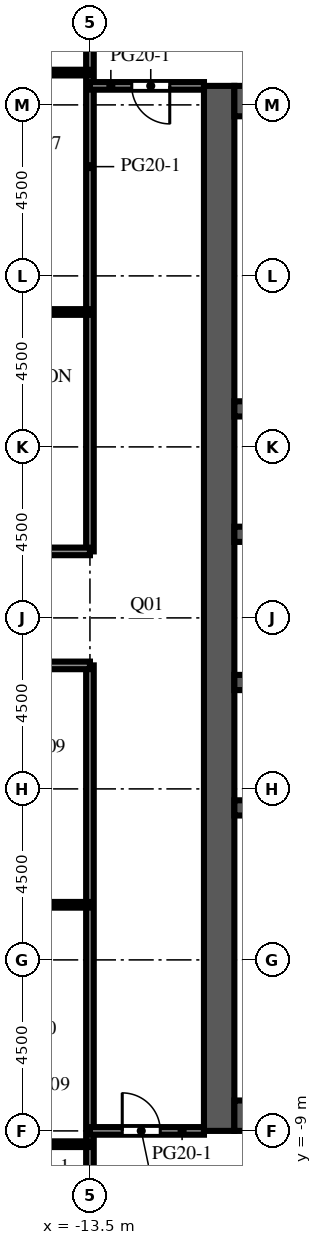
"""IFC4 building model, lengths in metres.
Left out: names, types, materials, properties, quantities, classifications, styles, units other than length and angle.
Written with IfcOpenShell. Run it as: python <this file> out.ifc"""

import sys

from ifc_helpers import new_model, si_unit, direction, frame, frame_2d, origin, place, context, subcontext, project, spatial, rectangle, extrude, element, fill, save


model = new_model("IFC4")
c1 = context("Model", 3, precision=1e-05, world=origin(), true_north=direction((0.0, 1.0)))
c2 = subcontext(c1, "Body", "Model", "MODEL_VIEW")
j1 = project(units=[si_unit("LENGTHUNIT", "METRE"), si_unit("PLANEANGLEUNIT", "RADIAN")], contexts=[c1])
p1 = place(None, origin())
s1 = spatial("IfcSite", under=j1, at=p1, CompositionType="ELEMENT")
p2 = place(p1, origin())
s2 = spatial("IfcBuilding", under=s1, at=p2, CompositionType="ELEMENT")
p3 = place(p2, frame((0.0, 0.0, 203.8)))
s3 = spatial("IfcBuildingStorey", under=s2, at=p3, CompositionType="ELEMENT", Elevation=203.8)
p4 = place(p3, frame((-10.1, -9.0, 0.0), z_axis=(0.0, 0.0, 1.0), x_axis=(0.0, 1.0, 0.0)))
e1 = element("IfcWall", 1, at=p4, inside=s3, PredefinedType="SHEAR", context=c2, shape_type="SweptSolid", body=[
    extrude(rectangle(XDim=27.5, YDim=0.8, at=frame_2d((13.75, 0.0))), origin(), (0.0, 0.0, 1.0), 4.1),
])
p5 = place(p4, frame((12.55, 0.0, 0.0)))
e2 = element("IfcOpeningElement", 2, at=p5, cuts=e1, PredefinedType="OPENING", context=c2, shape_type="SweptSolid", body=[
    extrude(rectangle(XDim=2.4, YDim=2.4, at=frame_2d((1.2, 1.2))), frame((0.0, 0.41, 0.0), z_axis=(0.0, -1.0, 0.0), x_axis=(1.0, 0.0, 0.0)), (0.0, 0.0, 1.0), 0.82),
])
p6 = place(p4, frame((6.825, 0.0, 0.0)))
e3 = element("IfcOpeningElement", 3, at=p6, cuts=e1, PredefinedType="OPENING", context=c2, shape_type="SweptSolid", body=[
    extrude(rectangle(XDim=1.2, YDim=2.1, at=frame_2d((0.6, 1.05))), frame((0.0, 0.41, 0.0), z_axis=(0.0, -1.0, 0.0), x_axis=(1.0, 0.0, 0.0)), (0.0, 0.0, 1.0), 0.82),
])
p7 = place(p4, frame((19.475, 0.0, 0.0)))
e4 = element("IfcOpeningElement", 4, at=p7, cuts=e1, PredefinedType="OPENING", context=c2, shape_type="SweptSolid", body=[
    extrude(rectangle(XDim=1.2, YDim=2.1, at=frame_2d((0.6, 1.05))), frame((0.0, 0.41, 0.0), z_axis=(0.0, -1.0, 0.0), x_axis=(1.0, 0.0, 0.0)), (0.0, 0.0, 1.0), 0.82),
])
for number, where, z_axis, x_axis in (
    (5, (-9.7, -8.6, 0.0), (0.0, 0.0, 1.0), (1.0, 0.0, 0.0)),
    (6, (-9.7, 18.1, 0.0), (0.0, 0.0, 1.0), (1.0, 0.0, 0.0)),
):
    element("IfcWall", number, at=place(p3, frame(where, z_axis=z_axis, x_axis=x_axis)), inside=s3, PredefinedType="SHEAR", context=c2, shape_type="SweptSolid", body=[
        extrude(rectangle(XDim=10.4, YDim=0.8, at=frame_2d((5.2, 0.0))), origin(), (0.0, 0.0, 1.0), 4.1),
    ])
p8 = place(p3, frame((-9.7, -0.5, 0.0), z_axis=(0.0, 0.0, 1.0), x_axis=(1.0, 0.0, 0.0)))
e7 = element("IfcWall", 7, at=p8, inside=s3, PredefinedType="SHEAR", context=c2, shape_type="SweptSolid", body=[
    extrude(rectangle(XDim=10.4, YDim=0.4, at=frame_2d((5.2, 0.0))), origin(), (0.0, 0.0, 1.0), 4.1),
])
p9 = place(p3, frame((-9.7, 2.8, 0.0), z_axis=(0.0, 0.0, 1.0), x_axis=(1.0, 0.0, 0.0)))
e8 = element("IfcWall", 8, at=p9, inside=s3, PredefinedType="SHEAR", context=c2, shape_type="SweptSolid", body=[
    extrude(rectangle(XDim=10.4, YDim=0.4, at=frame_2d((5.2, 0.0))), origin(), (0.0, 0.0, 1.0), 4.1),
])
p10 = place(p9, frame((0.738, 0.0, 0.0)))
e9 = element("IfcOpeningElement", 9, at=p10, cuts=e8, PredefinedType="OPENING", context=c2, shape_type="SweptSolid", body=[
    extrude(rectangle(XDim=1.1, YDim=2.1, at=frame_2d((0.55, 1.05))), frame((0.0, 0.21, 0.0), z_axis=(0.0, -1.0, 0.0), x_axis=(1.0, 0.0, 0.0)), (0.0, 0.0, 1.0), 0.42),
])
p11 = place(p9, frame((3.337, 0.0, 0.0)))
e10 = element("IfcOpeningElement", 10, at=p11, cuts=e8, PredefinedType="OPENING", context=c2, shape_type="SweptSolid", body=[
    extrude(rectangle(XDim=1.1, YDim=2.1, at=frame_2d((0.55, 1.05))), frame((0.0, 0.21, 0.0), z_axis=(0.0, -1.0, 0.0), x_axis=(1.0, 0.0, 0.0)), (0.0, 0.0, 1.0), 0.42),
])
p12 = place(p9, frame((6.012, 0.0, 0.0)))
e11 = element("IfcOpeningElement", 11, at=p12, cuts=e8, PredefinedType="OPENING", context=c2, shape_type="SweptSolid", body=[
    extrude(rectangle(XDim=1.0, YDim=2.1, at=frame_2d((0.5, 1.05))), frame((0.0, 0.21, 0.0), z_axis=(0.0, -1.0, 0.0), x_axis=(1.0, 0.0, 0.0)), (0.0, 0.0, 1.0), 0.42),
])
p13 = place(p9, frame((8.613, 0.0, 0.0)))
e12 = element("IfcOpeningElement", 12, at=p13, cuts=e8, PredefinedType="OPENING", context=c2, shape_type="SweptSolid", body=[
    extrude(rectangle(XDim=1.0, YDim=2.1, at=frame_2d((0.5, 1.05))), frame((0.0, 0.21, 0.0), z_axis=(0.0, -1.0, 0.0), x_axis=(1.0, 0.0, 0.0)), (0.0, 0.0, 1.0), 0.42),
])
p14 = place(p3, frame((-9.7, 6.7, 0.0), z_axis=(0.0, 0.0, 1.0), x_axis=(1.0, 0.0, 0.0)))
e13 = element("IfcWall", 13, at=p14, inside=s3, PredefinedType="SHEAR", context=c2, shape_type="SweptSolid", body=[
    extrude(rectangle(XDim=10.4, YDim=0.4, at=frame_2d((5.2, 0.0))), origin(), (0.0, 0.0, 1.0), 4.1),
])
p15 = place(p14, frame((3.337, 0.0, 0.0)))
e14 = element("IfcOpeningElement", 14, at=p15, cuts=e13, PredefinedType="OPENING", context=c2, shape_type="SweptSolid", body=[
    extrude(rectangle(XDim=1.1, YDim=2.1, at=frame_2d((0.55, 1.05))), frame((0.0, 0.21, 0.0), z_axis=(0.0, -1.0, 0.0), x_axis=(1.0, 0.0, 0.0)), (0.0, 0.0, 1.0), 0.42),
])
p16 = place(p14, frame((5.962, 0.0, 0.0)))
e15 = element("IfcOpeningElement", 15, at=p16, cuts=e13, PredefinedType="OPENING", context=c2, shape_type="SweptSolid", body=[
    extrude(rectangle(XDim=1.1, YDim=2.1, at=frame_2d((0.55, 1.05))), frame((0.0, 0.21, 0.0), z_axis=(0.0, -1.0, 0.0), x_axis=(1.0, 0.0, 0.0)), (0.0, 0.0, 1.0), 0.42),
])
p17 = place(p14, frame((8.663, 0.0, 0.0)))
e16 = element("IfcOpeningElement", 16, at=p17, cuts=e13, PredefinedType="OPENING", context=c2, shape_type="SweptSolid", body=[
    extrude(rectangle(XDim=1.1, YDim=2.1, at=frame_2d((0.55, 1.05))), frame((0.0, 0.21, 0.0), z_axis=(0.0, -1.0, 0.0), x_axis=(1.0, 0.0, 0.0)), (0.0, 0.0, 1.0), 0.42),
])
p18 = place(p14, frame((0.688, 0.0, 0.0)))
e17 = element("IfcOpeningElement", 17, at=p18, cuts=e13, PredefinedType="OPENING", context=c2, shape_type="SweptSolid", body=[
    extrude(rectangle(XDim=1.0, YDim=2.1, at=frame_2d((0.5, 1.05))), frame((0.0, 0.21, 0.0), z_axis=(0.0, -1.0, 0.0), x_axis=(1.0, 0.0, 0.0)), (0.0, 0.0, 1.0), 0.42),
])
p19 = place(p3, frame((-9.7, 10.0, 0.0), z_axis=(0.0, 0.0, 1.0), x_axis=(1.0, 0.0, 0.0)))
e18 = element("IfcWall", 18, at=p19, inside=s3, PredefinedType="SHEAR", context=c2, shape_type="SweptSolid", body=[
    extrude(rectangle(XDim=10.4, YDim=0.4, at=frame_2d((5.2, 0.0))), origin(), (0.0, 0.0, 1.0), 4.1),
])
p20 = place(p3, frame((-13.5, -26.5, 0.0), z_axis=(0.0, 0.0, 1.0), x_axis=(0.0, 1.0, 0.0)))
e19 = element("IfcWall", 19, at=p20, inside=s3, PredefinedType="PARTITIONING", context=c2, shape_type="SweptSolid", body=[
    extrude(rectangle(XDim=29.75, YDim=0.2, at=frame_2d((14.875, 0.0))), origin(), (0.0, 0.0, 1.0), 3.65),
])
p21 = place(p3, frame((-13.5, 6.25, 0.0), z_axis=(0.0, 0.0, 1.0), x_axis=(0.0, 1.0, 0.0)))
e20 = element("IfcWall", 20, at=p21, inside=s3, PredefinedType="PARTITIONING", context=c2, shape_type="SweptSolid", body=[
    extrude(rectangle(XDim=20.25, YDim=0.2, at=frame_2d((10.125, 0.0))), origin(), (0.0, 0.0, 1.0), 3.65),
])
p22 = place(p3, frame((-13.5, -9.35, 0.0), z_axis=(0.0, 0.0, 1.0), x_axis=(-1.0, 0.0, 0.0)))
e21 = element("IfcWall", 21, at=p22, inside=s3, PredefinedType="PARTITIONING", context=c2, shape_type="SweptSolid", body=[
    extrude(rectangle(XDim=3.9, YDim=0.15, at=frame_2d((1.95, 0.0))), origin(), (0.0, 0.0, 1.0), 3.65),
])
p23 = place(p22, frame((2.65, 0.0, 0.0)))
e22 = element("IfcOpeningElement", 22, at=p23, cuts=e21, PredefinedType="OPENING", context=c2, shape_type="SweptSolid", body=[
    extrude(rectangle(XDim=1.0, YDim=2.1, at=frame_2d((0.5, 1.05))), frame((0.0, 0.085, 0.0), z_axis=(0.0, -1.0, 0.0), x_axis=(1.0, 0.0, 0.0)), (0.0, 0.0, 1.0), 0.17),
])
p24 = place(p3, frame((-10.5, -9.0, 0.0), z_axis=(0.0, 0.0, 1.0), x_axis=(-1.0, 0.0, 0.0)))
e23 = element("IfcWall", 23, at=p24, inside=s3, PredefinedType="PARTITIONING", context=c2, shape_type="SweptSolid", body=[
    extrude(rectangle(XDim=3.0, YDim=0.2, at=frame_2d((1.5, 0.0))), origin(), (0.0, 0.0, 1.0), 3.65),
])
p25 = place(p24, frame((1.15, 0.0, 0.0)))
e24 = element("IfcOpeningElement", 24, at=p25, cuts=e23, PredefinedType="OPENING", context=c2, shape_type="SweptSolid", body=[
    extrude(rectangle(XDim=1.0, YDim=2.1, at=frame_2d((0.5, 1.05))), frame((0.0, 0.11, 0.0), z_axis=(0.0, -1.0, 0.0), x_axis=(1.0, 0.0, 0.0)), (0.0, 0.0, 1.0), 0.22),
])
p26 = place(p3, frame((-13.5, -3.05, 0.0), z_axis=(0.0, 0.0, 1.0), x_axis=(-1.0, 0.0, 0.0)))
e25 = element("IfcWall", 25, at=p26, inside=s3, PredefinedType="PARTITIONING", context=c2, shape_type="SweptSolid", body=[
    extrude(rectangle(XDim=8.85, YDim=0.15, at=frame_2d((4.425, 0.0))), origin(), (0.0, 0.0, 1.0), 3.65),
])
p27 = place(p26, frame((3.4, 0.0, 0.0)))
e26 = element("IfcOpeningElement", 26, at=p27, cuts=e25, PredefinedType="OPENING", context=c2, shape_type="SweptSolid", body=[
    extrude(rectangle(XDim=1.0, YDim=2.1, at=frame_2d((0.5, 1.05))), frame((0.0, 0.085, 0.0), z_axis=(0.0, -1.0, 0.0), x_axis=(1.0, 0.0, 0.0)), (0.0, 0.0, 1.0), 0.17),
])
p28 = place(p3, frame((-13.5, 3.25, 0.0), z_axis=(0.0, 0.0, 1.0), x_axis=(-1.0, 0.0, 0.0)))
e27 = element("IfcWall", 27, at=p28, inside=s3, PredefinedType="PARTITIONING", context=c2, shape_type="SweptSolid", body=[
    extrude(rectangle(XDim=8.85, YDim=0.2, at=frame_2d((4.425, 0.0))), origin(), (0.0, 0.0, 1.0), 3.65),
])
p29 = place(p28, frame((4.65, 0.0, 0.0)))
e28 = element("IfcOpeningElement", 28, at=p29, cuts=e27, PredefinedType="OPENING", context=c2, shape_type="SweptSolid", body=[
    extrude(rectangle(XDim=1.0, YDim=2.1, at=frame_2d((0.5, 1.05))), frame((0.0, 0.11, 0.0), z_axis=(0.0, -1.0, 0.0), x_axis=(1.0, 0.0, 0.0)), (0.0, 0.0, 1.0), 0.22),
])
p30 = place(p3, frame((-22.35, 6.25, 0.0), z_axis=(0.0, 0.0, 1.0), x_axis=(1.0, 0.0, 0.0)))
e29 = element("IfcWall", 29, at=p30, inside=s3, PredefinedType="PARTITIONING", context=c2, shape_type="SweptSolid", body=[
    extrude(rectangle(XDim=8.85, YDim=0.2, at=frame_2d((4.425, 0.0))), origin(), (0.0, 0.0, 1.0), 3.65),
])
p31 = place(p30, frame((4.2, 0.0, 0.0)))
e30 = element("IfcOpeningElement", 30, at=p31, cuts=e29, PredefinedType="OPENING", context=c2, shape_type="SweptSolid", body=[
    extrude(rectangle(XDim=1.0, YDim=2.1, at=frame_2d((0.5, 1.05))), frame((0.0, 0.11, 0.0), z_axis=(0.0, -1.0, 0.0), x_axis=(1.0, 0.0, 0.0)), (0.0, 0.0, 1.0), 0.22),
])
p32 = place(p3, frame((-22.35, 12.55, 0.0), z_axis=(0.0, 0.0, 1.0), x_axis=(1.0, 0.0, 0.0)))
e31 = element("IfcWall", 31, at=p32, inside=s3, PredefinedType="PARTITIONING", context=c2, shape_type="SweptSolid", body=[
    extrude(rectangle(XDim=8.85, YDim=0.15, at=frame_2d((4.425, 0.0))), origin(), (0.0, 0.0, 1.0), 3.65),
])
p33 = place(p32, frame((4.2, 0.0, 0.0)))
e32 = element("IfcOpeningElement", 32, at=p33, cuts=e31, PredefinedType="OPENING", context=c2, shape_type="SweptSolid", body=[
    extrude(rectangle(XDim=1.0, YDim=2.1, at=frame_2d((0.5, 1.05))), frame((0.0, 0.085, 0.0), z_axis=(0.0, -1.0, 0.0), x_axis=(1.0, 0.0, 0.0)), (0.0, 0.0, 1.0), 0.17),
])
p34 = place(p3, frame((-13.5, 18.5, 0.0), z_axis=(0.0, 0.0, 1.0), x_axis=(1.0, 0.0, 0.0)))
e33 = element("IfcWall", 33, at=p34, inside=s3, PredefinedType="PARTITIONING", context=c2, shape_type="SweptSolid", body=[
    extrude(rectangle(XDim=3.0, YDim=0.2, at=frame_2d((1.5, 0.0))), origin(), (0.0, 0.0, 1.0), 3.65),
])
p35 = place(p34, frame((1.1, 0.0, 0.0)))
e34 = element("IfcOpeningElement", 34, at=p35, cuts=e33, PredefinedType="OPENING", context=c2, shape_type="SweptSolid", body=[
    extrude(rectangle(XDim=1.0, YDim=2.1, at=frame_2d((0.5, 1.05))), frame((0.0, 0.11, 0.0), z_axis=(0.0, -1.0, 0.0), x_axis=(1.0, 0.0, 0.0)), (0.0, 0.0, 1.0), 0.22),
])
p36 = place(p3, frame((-22.35, 18.85, 0.0), z_axis=(0.0, 0.0, 1.0), x_axis=(1.0, 0.0, 0.0)))
e35 = element("IfcWall", 35, at=p36, inside=s3, PredefinedType="PARTITIONING", context=c2, shape_type="SweptSolid", body=[
    extrude(rectangle(XDim=8.85, YDim=0.15, at=frame_2d((4.425, 0.0))), origin(), (0.0, 0.0, 1.0), 3.65),
])
p37 = place(p36, frame((5.2, 0.0, 0.0)))
e36 = element("IfcOpeningElement", 36, at=p37, cuts=e35, PredefinedType="OPENING", context=c2, shape_type="SweptSolid", body=[
    extrude(rectangle(XDim=1.0, YDim=2.1, at=frame_2d((0.5, 1.05))), frame((0.0, 0.085, 0.0), z_axis=(0.0, -1.0, 0.0), x_axis=(1.0, 0.0, 0.0)), (0.0, 0.0, 1.0), 0.17),
])
p38 = place(p5, origin())
e37 = element("IfcDoor", 37, at=p38, inside=s3, OperationType="DOUBLE_DOOR_DOUBLE_SWING", PredefinedType="DOOR", context=c2, shape_type="SweptSolid", body=[
    extrude(rectangle(XDim=2.4, YDim=2.4, at=frame_2d((1.2, 1.2))), frame((0.0, 0.025, 0.0), z_axis=(0.0, -1.0, 0.0), x_axis=(1.0, 0.0, 0.0)), (0.0, 0.0, 1.0), 0.05),
])
fill(e2, e37)
p39 = place(p6, origin())
e38 = element("IfcDoor", 38, at=p39, inside=s3, OperationType="SINGLE_SWING_LEFT", PredefinedType="DOOR", context=c2, shape_type="SweptSolid", body=[
    extrude(rectangle(XDim=1.2, YDim=2.1, at=frame_2d((0.6, 1.05))), frame((0.0, 0.025, 0.0), z_axis=(0.0, -1.0, 0.0), x_axis=(1.0, 0.0, 0.0)), (0.0, 0.0, 1.0), 0.05),
])
fill(e3, e38)
p40 = place(p7, origin())
e39 = element("IfcDoor", 39, at=p40, inside=s3, OperationType="SINGLE_SWING_LEFT", PredefinedType="DOOR", context=c2, shape_type="SweptSolid", body=[
    extrude(rectangle(XDim=1.2, YDim=2.1, at=frame_2d((0.6, 1.05))), frame((0.0, 0.025, 0.0), z_axis=(0.0, -1.0, 0.0), x_axis=(1.0, 0.0, 0.0)), (0.0, 0.0, 1.0), 0.05),
])
fill(e4, e39)
p41 = place(p25, origin())
e40 = element("IfcDoor", 40, at=p41, inside=s3, OperationType="SINGLE_SWING_RIGHT", PredefinedType="DOOR", context=c2, shape_type="SweptSolid", body=[
    extrude(rectangle(XDim=1.0, YDim=2.1, at=frame_2d((0.5, 1.05))), frame((0.0, 0.025, 0.0), z_axis=(0.0, -1.0, 0.0), x_axis=(1.0, 0.0, 0.0)), (0.0, 0.0, 1.0), 0.05),
])
fill(e24, e40)
p42 = place(p35, origin())
e41 = element("IfcDoor", 41, at=p42, inside=s3, OperationType="SINGLE_SWING_RIGHT", PredefinedType="DOOR", context=c2, shape_type="SweptSolid", body=[
    extrude(rectangle(XDim=1.0, YDim=2.1, at=frame_2d((0.5, 1.05))), frame((0.0, 0.025, 0.0), z_axis=(0.0, -1.0, 0.0), x_axis=(1.0, 0.0, 0.0)), (0.0, 0.0, 1.0), 0.05),
])
fill(e34, e41)
save(model, sys.argv[1])
